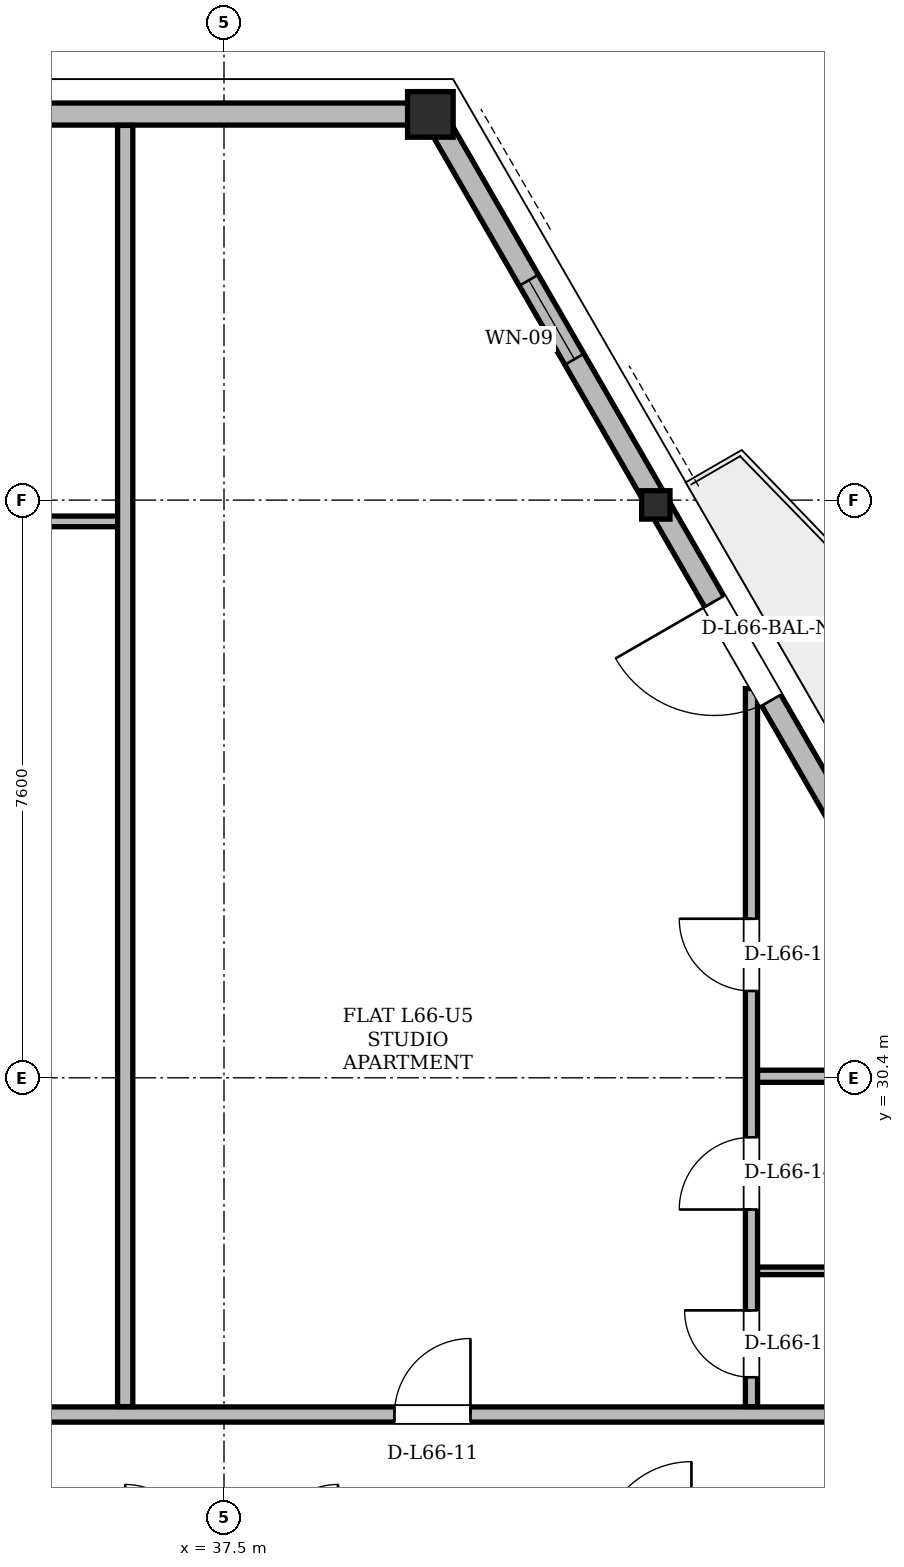
"""IFC4 building model, lengths in metres.
Left out: names, types, materials, properties, quantities, classifications, styles, units other than length and angle.
Written with IfcOpenShell. Run it as: python <this file> out.ifc"""

import sys

from ifc_helpers import new_model, si_unit, direction, frame, frame_2d, origin, origin_2d, place, context, subcontext, project, spatial, rectangle, hollow_rectangle, i_section, extrude, element, fill, save


model = new_model("IFC4")
c1 = context("Model", 3, precision=1e-05, world=origin(), true_north=direction((0.0, 1.0)))
c2 = subcontext(c1, "Body", "Model", "MODEL_VIEW")
j1 = project(units=[si_unit("LENGTHUNIT", "METRE"), si_unit("PLANEANGLEUNIT", "RADIAN")], contexts=[c1])
p1 = place(None, origin())
s1 = spatial("IfcSite", under=j1, at=p1, CompositionType="ELEMENT")
p2 = place(p1, origin())
s2 = spatial("IfcBuilding", under=s1, at=p2, CompositionType="ELEMENT")
p3 = place(p2, frame((0.0, 0.0, 249.9)))
s3 = spatial("IfcBuildingStorey", under=s2, at=p3, CompositionType="ELEMENT", Elevation=249.9)
p4 = place(p3, frame((40.248, 43.079, 0.005), z_axis=(-0.01700194625, -0.002446774553, 0.999852462675), x_axis=(0.142443955325, -0.989802869056, 0.0)))
e1 = element("IfcColumn", 1, at=p4, inside=s3, PredefinedType="COLUMN", context=c2, shape_type="SweptSolid", body=[
    extrude(hollow_rectangle(XDim=0.6, YDim=0.6, WallThickness=0.045, at=origin_2d()), origin(), (0.0, 0.0, 1.0), 3.891),
])
p5 = place(p3, frame((43.212, 37.945, 0.005), z_axis=(-0.015935594489, -0.004140745025, 0.999864446342), x_axis=(0.251491081289, -0.96785961587, 0.0)))
e2 = element("IfcColumn", 2, at=p5, inside=s3, PredefinedType="COLUMN", context=c2, shape_type="SweptSolid", body=[
    extrude(i_section(OverallWidth=0.373, OverallDepth=0.373, WebThickness=0.016, FlangeThickness=0.026, at=origin_2d()), origin(), (0.0, 0.0, 1.0), 3.891),
])
p6 = place(p3, frame((58.774, 10.99, 0.0), z_axis=(0.0, 0.0, 1.0), x_axis=(-0.499994896969, 0.866028350001, 0.0)))
e3 = element("IfcWall", 3, at=p6, inside=s3, PredefinedType="SOLIDWALL", context=c2, shape_type="SweptSolid", body=[
    extrude(rectangle(XDim=37.053, YDim=0.29, at=frame_2d((18.526, 0.0))), origin(), (0.0, 0.0, 1.0), 3.058),
])
p7 = place(p6, frame((6.789, 0.0, 0.0)))
e4 = element("IfcOpeningElement", 4, at=p7, cuts=e3, PredefinedType="OPENING", context=c2, shape_type="SweptSolid", body=[
    extrude(rectangle(XDim=1.5, YDim=2.2, at=frame_2d((0.75, 1.1))), frame((0.0, 0.145, 0.0), z_axis=(0.0, -1.0, 0.0), x_axis=(1.0, 0.0, 0.0)), (0.0, 0.0, 1.0), 0.29),
])
p8 = place(p6, frame((28.148, 0.0, 0.0)))
e5 = element("IfcOpeningElement", 5, at=p8, cuts=e3, PredefinedType="OPENING", context=c2, shape_type="SweptSolid", body=[
    extrude(rectangle(XDim=1.5, YDim=2.2, at=frame_2d((0.75, 1.1))), frame((0.0, 0.145, 0.0), z_axis=(0.0, -1.0, 0.0), x_axis=(1.0, 0.0, 0.0)), (0.0, 0.0, 1.0), 0.29),
])
p9 = place(p6, frame((12.184, 0.0, 0.85)))
e6 = element("IfcOpeningElement", 6, at=p9, cuts=e3, PredefinedType="OPENING", context=c2, shape_type="SweptSolid", body=[
    extrude(rectangle(XDim=2.6, YDim=1.95, at=frame_2d((1.3, 0.975))), frame((0.0, 0.145, 0.0), z_axis=(0.0, -1.0, 0.0), x_axis=(1.0, 0.0, 0.0)), (0.0, 0.0, 1.0), 0.29),
])
p10 = place(p6, frame((1.066, 0.0, 0.85)))
e7 = element("IfcOpeningElement", 7, at=p10, cuts=e3, PredefinedType="OPENING", context=c2, shape_type="SweptSolid", body=[
    extrude(rectangle(XDim=2.4, YDim=1.9, at=frame_2d((1.2, 0.95))), frame((0.0, 0.145, 0.0), z_axis=(0.0, -1.0, 0.0), x_axis=(1.0, 0.0, 0.0)), (0.0, 0.0, 1.0), 0.29),
])
p11 = place(p6, frame((33.328, 0.0, 0.85)))
e8 = element("IfcOpeningElement", 8, at=p11, cuts=e3, PredefinedType="OPENING", context=c2, shape_type="SweptSolid", body=[
    extrude(rectangle(XDim=1.2, YDim=1.48, at=frame_2d((0.6, 0.74))), frame((0.0, 0.145, 0.0), z_axis=(0.0, -1.0, 0.0), x_axis=(1.0, 0.0, 0.0)), (0.0, 0.0, 1.0), 0.29),
])
p12 = place(p6, frame((15.822, 0.0, 0.85)))
e9 = element("IfcOpeningElement", 9, at=p12, cuts=e3, PredefinedType="OPENING", context=c2, shape_type="SweptSolid", body=[
    extrude(rectangle(XDim=1.2, YDim=1.48, at=frame_2d((0.6, 0.74))), frame((0.0, 0.145, 0.0), z_axis=(0.0, -1.0, 0.0), x_axis=(1.0, 0.0, 0.0)), (0.0, 0.0, 1.0), 0.29),
])
p13 = place(p6, frame((23.327, 0.0, 0.85)))
e10 = element("IfcOpeningElement", 10, at=p13, cuts=e3, PredefinedType="OPENING", context=c2, shape_type="SweptSolid", body=[
    extrude(rectangle(XDim=1.2, YDim=1.48, at=frame_2d((0.6, 0.74))), frame((0.0, 0.145, 0.0), z_axis=(0.0, -1.0, 0.0), x_axis=(1.0, 0.0, 0.0)), (0.0, 0.0, 1.0), 0.29),
])
p14 = place(p3, frame((40.248, 43.079, 0.0), z_axis=(0.0, 0.0, 1.0), x_axis=(-1.0, 0.0, 0.0)))
e11 = element("IfcWall", 11, at=p14, inside=s3, PredefinedType="SOLIDWALL", context=c2, shape_type="SweptSolid", body=[
    extrude(rectangle(XDim=5.497, YDim=0.29, at=frame_2d((2.748, 0.0))), origin(), (0.0, 0.0, 1.0), 3.058),
])
p15 = place(p3, frame((25.6, 25.97, 0.0), z_axis=(0.0, 0.0, 1.0), x_axis=(1.0, 0.0, 0.0)))
e12 = element("IfcWall", 12, at=p15, inside=s3, PredefinedType="PARTITIONING", context=c2, shape_type="SweptSolid", body=[
    extrude(rectangle(XDim=21.85, YDim=0.2, at=frame_2d((10.925, 0.0))), origin(), (0.0, 0.0, 1.0), 3.266),
])
p16 = place(p15, frame((4.747, 0.0, 0.0)))
e13 = element("IfcOpeningElement", 13, at=p16, cuts=e12, PredefinedType="OPENING", context=c2, shape_type="SweptSolid", body=[
    extrude(rectangle(XDim=1.0, YDim=2.18, at=frame_2d((0.5, 1.09))), frame((0.0, 0.1, 0.0), z_axis=(0.0, -1.0, 0.0), x_axis=(1.0, 0.0, 0.0)), (0.0, 0.0, 1.0), 0.2),
])
p17 = place(p15, frame((14.143, 0.0, 0.0)))
e14 = element("IfcOpeningElement", 14, at=p17, cuts=e12, PredefinedType="OPENING", context=c2, shape_type="SweptSolid", body=[
    extrude(rectangle(XDim=1.0, YDim=2.18, at=frame_2d((0.5, 1.09))), frame((0.0, 0.1, 0.0), z_axis=(0.0, -1.0, 0.0), x_axis=(1.0, 0.0, 0.0)), (0.0, 0.0, 1.0), 0.2),
])
p18 = place(p3, frame((44.435, 27.86, 0.0), z_axis=(0.0, 0.0, 1.0), x_axis=(1.0, 0.0, 0.0)))
e15 = element("IfcWall", 15, at=p18, inside=s3, PredefinedType="PARTITIONING", context=c2, shape_type="SweptSolid", body=[
    extrude(rectangle(XDim=4.428, YDim=0.1, at=frame_2d((2.214, 0.0))), origin(), (0.0, 0.0, 1.0), 3.68),
])
p19 = place(p3, frame((44.435, 30.42, 0.0), z_axis=(0.0, 0.0, 1.0), x_axis=(1.0, 0.0, 0.0)))
e16 = element("IfcWall", 16, at=p19, inside=s3, PredefinedType="PARTITIONING", context=c2, shape_type="SweptSolid", body=[
    extrude(rectangle(XDim=2.95, YDim=0.16, at=frame_2d((1.475, 0.0))), origin(), (0.0, 0.0, 1.0), 3.68),
])
p20 = place(p3, frame((31.83, 37.72, 0.0), z_axis=(0.0, 0.0, 1.0), x_axis=(1.0, 0.0, 0.0)))
e17 = element("IfcWall", 17, at=p20, inside=s3, PredefinedType="PARTITIONING", context=c2, shape_type="SweptSolid", body=[
    extrude(rectangle(XDim=4.452, YDim=0.14, at=frame_2d((2.226, 0.0))), origin(), (0.0, 0.0, 1.0), 3.266),
])
p21 = place(p20, frame((1.745, 0.0, 0.0)))
e18 = element("IfcOpeningElement", 18, at=p21, cuts=e17, PredefinedType="OPENING", context=c2, shape_type="SweptSolid", body=[
    extrude(rectangle(XDim=0.88, YDim=2.08, at=frame_2d((0.44, 1.04))), frame((0.0, 0.07, 0.0), z_axis=(0.0, -1.0, 0.0), x_axis=(1.0, 0.0, 0.0)), (0.0, 0.0, 1.0), 0.14),
])
p22 = place(p3, frame((36.2, 26.074, 0.0), z_axis=(0.0, 0.0, 1.0), x_axis=(0.0, 1.0, 0.0)))
e19 = element("IfcWall", 19, at=p22, inside=s3, PredefinedType="PARTITIONING", context=c2, shape_type="SweptSolid", body=[
    extrude(rectangle(XDim=16.856, YDim=0.2, at=frame_2d((8.428, 0.0))), origin(), (0.0, 0.0, 1.0), 3.68),
])
p23 = place(p3, frame((44.44, 26.074, 0.0), z_axis=(0.0, 0.0, 1.0), x_axis=(0.0, 1.0, 0.0)))
e20 = element("IfcWall", 20, at=p23, inside=s3, PredefinedType="PARTITIONING", context=c2, shape_type="SweptSolid", body=[
    extrude(rectangle(XDim=9.447, YDim=0.16, at=frame_2d((4.723, 0.0))), origin(), (0.0, 0.0, 1.0), 3.058),
])
p24 = place(p23, frame((0.386, 0.0, 0.0)))
e21 = element("IfcOpeningElement", 21, at=p24, cuts=e20, PredefinedType="OPENING", context=c2, shape_type="SweptSolid", body=[
    extrude(rectangle(XDim=0.88, YDim=2.08, at=frame_2d((0.44, 1.04))), frame((0.0, 0.08, 0.0), z_axis=(0.0, -1.0, 0.0), x_axis=(1.0, 0.0, 0.0)), (0.0, 0.0, 1.0), 0.16),
])
p25 = place(p23, frame((2.593, 0.0, 0.0)))
e22 = element("IfcOpeningElement", 22, at=p25, cuts=e20, PredefinedType="OPENING", context=c2, shape_type="SweptSolid", body=[
    extrude(rectangle(XDim=0.95, YDim=2.1, at=frame_2d((0.475, 1.05))), frame((0.0, 0.08, 0.0), z_axis=(0.0, -1.0, 0.0), x_axis=(1.0, 0.0, 0.0)), (0.0, 0.0, 1.0), 0.16),
])
p26 = place(p23, frame((5.468, 0.0, 0.0)))
e23 = element("IfcOpeningElement", 23, at=p26, cuts=e20, PredefinedType="OPENING", context=c2, shape_type="SweptSolid", body=[
    extrude(rectangle(XDim=0.95, YDim=2.1, at=frame_2d((0.475, 1.05))), frame((0.0, 0.08, 0.0), z_axis=(0.0, -1.0, 0.0), x_axis=(1.0, 0.0, 0.0)), (0.0, 0.0, 1.0), 0.16),
])
p27 = place(p8, origin())
e24 = element("IfcDoor", 24, at=p27, inside=s3, OperationType="SINGLE_SWING_RIGHT", PredefinedType="DOOR", context=c2, shape_type="SweptSolid", body=[
    extrude(rectangle(XDim=1.5, YDim=2.2, at=frame_2d((0.75, 1.1))), frame((0.0, 0.025, 0.0), z_axis=(0.0, -1.0, 0.0), x_axis=(1.0, 0.0, 0.0)), (0.0, 0.0, 1.0), 0.05),
])
fill(e5, e24)
p28 = place(p11, origin())
e25 = element("IfcWindow", 25, at=p28, inside=s3, PartitioningType="SINGLE_PANEL", PredefinedType="WINDOW", context=c2, shape_type="SweptSolid", body=[
    extrude(rectangle(XDim=1.2, YDim=1.48, at=frame_2d((0.6, 0.74))), frame((0.0, 0.03, 0.0), z_axis=(0.0, -1.0, 0.0), x_axis=(1.0, 0.0, 0.0)), (0.0, 0.0, 1.0), 0.06),
])
fill(e8, e25)
p29 = place(p17, origin())
e26 = element("IfcDoor", 26, at=p29, inside=s3, OperationType="SINGLE_SWING_RIGHT", PredefinedType="DOOR", context=c2, shape_type="SweptSolid", body=[
    extrude(rectangle(XDim=1.0, YDim=2.18, at=frame_2d((0.5, 1.09))), frame((0.0, 0.025, 0.0), z_axis=(0.0, -1.0, 0.0), x_axis=(1.0, 0.0, 0.0)), (0.0, 0.0, 1.0), 0.05),
])
fill(e14, e26)
p30 = place(p24, origin())
e27 = element("IfcDoor", 27, at=p30, inside=s3, OperationType="SINGLE_SWING_RIGHT", PredefinedType="DOOR", context=c2, shape_type="SweptSolid", body=[
    extrude(rectangle(XDim=0.88, YDim=2.08, at=frame_2d((0.44, 1.04))), frame((0.0, 0.025, 0.0), z_axis=(0.0, -1.0, 0.0), x_axis=(1.0, 0.0, 0.0)), (0.0, 0.0, 1.0), 0.05),
])
fill(e21, e27)
p31 = place(p25, origin())
e28 = element("IfcDoor", 28, at=p31, inside=s3, OperationType="SINGLE_SWING_LEFT", PredefinedType="DOOR", context=c2, shape_type="SweptSolid", body=[
    extrude(rectangle(XDim=0.95, YDim=2.1, at=frame_2d((0.475, 1.05))), frame((0.0, 0.025, 0.0), z_axis=(0.0, -1.0, 0.0), x_axis=(1.0, 0.0, 0.0)), (0.0, 0.0, 1.0), 0.05),
])
fill(e22, e28)
p32 = place(p26, origin())
e29 = element("IfcDoor", 29, at=p32, inside=s3, OperationType="SINGLE_SWING_RIGHT", PredefinedType="DOOR", context=c2, shape_type="SweptSolid", body=[
    extrude(rectangle(XDim=0.95, YDim=2.1, at=frame_2d((0.475, 1.05))), frame((0.0, 0.025, 0.0), z_axis=(0.0, -1.0, 0.0), x_axis=(1.0, 0.0, 0.0)), (0.0, 0.0, 1.0), 0.05),
])
fill(e23, e29)
save(model, sys.argv[1])
